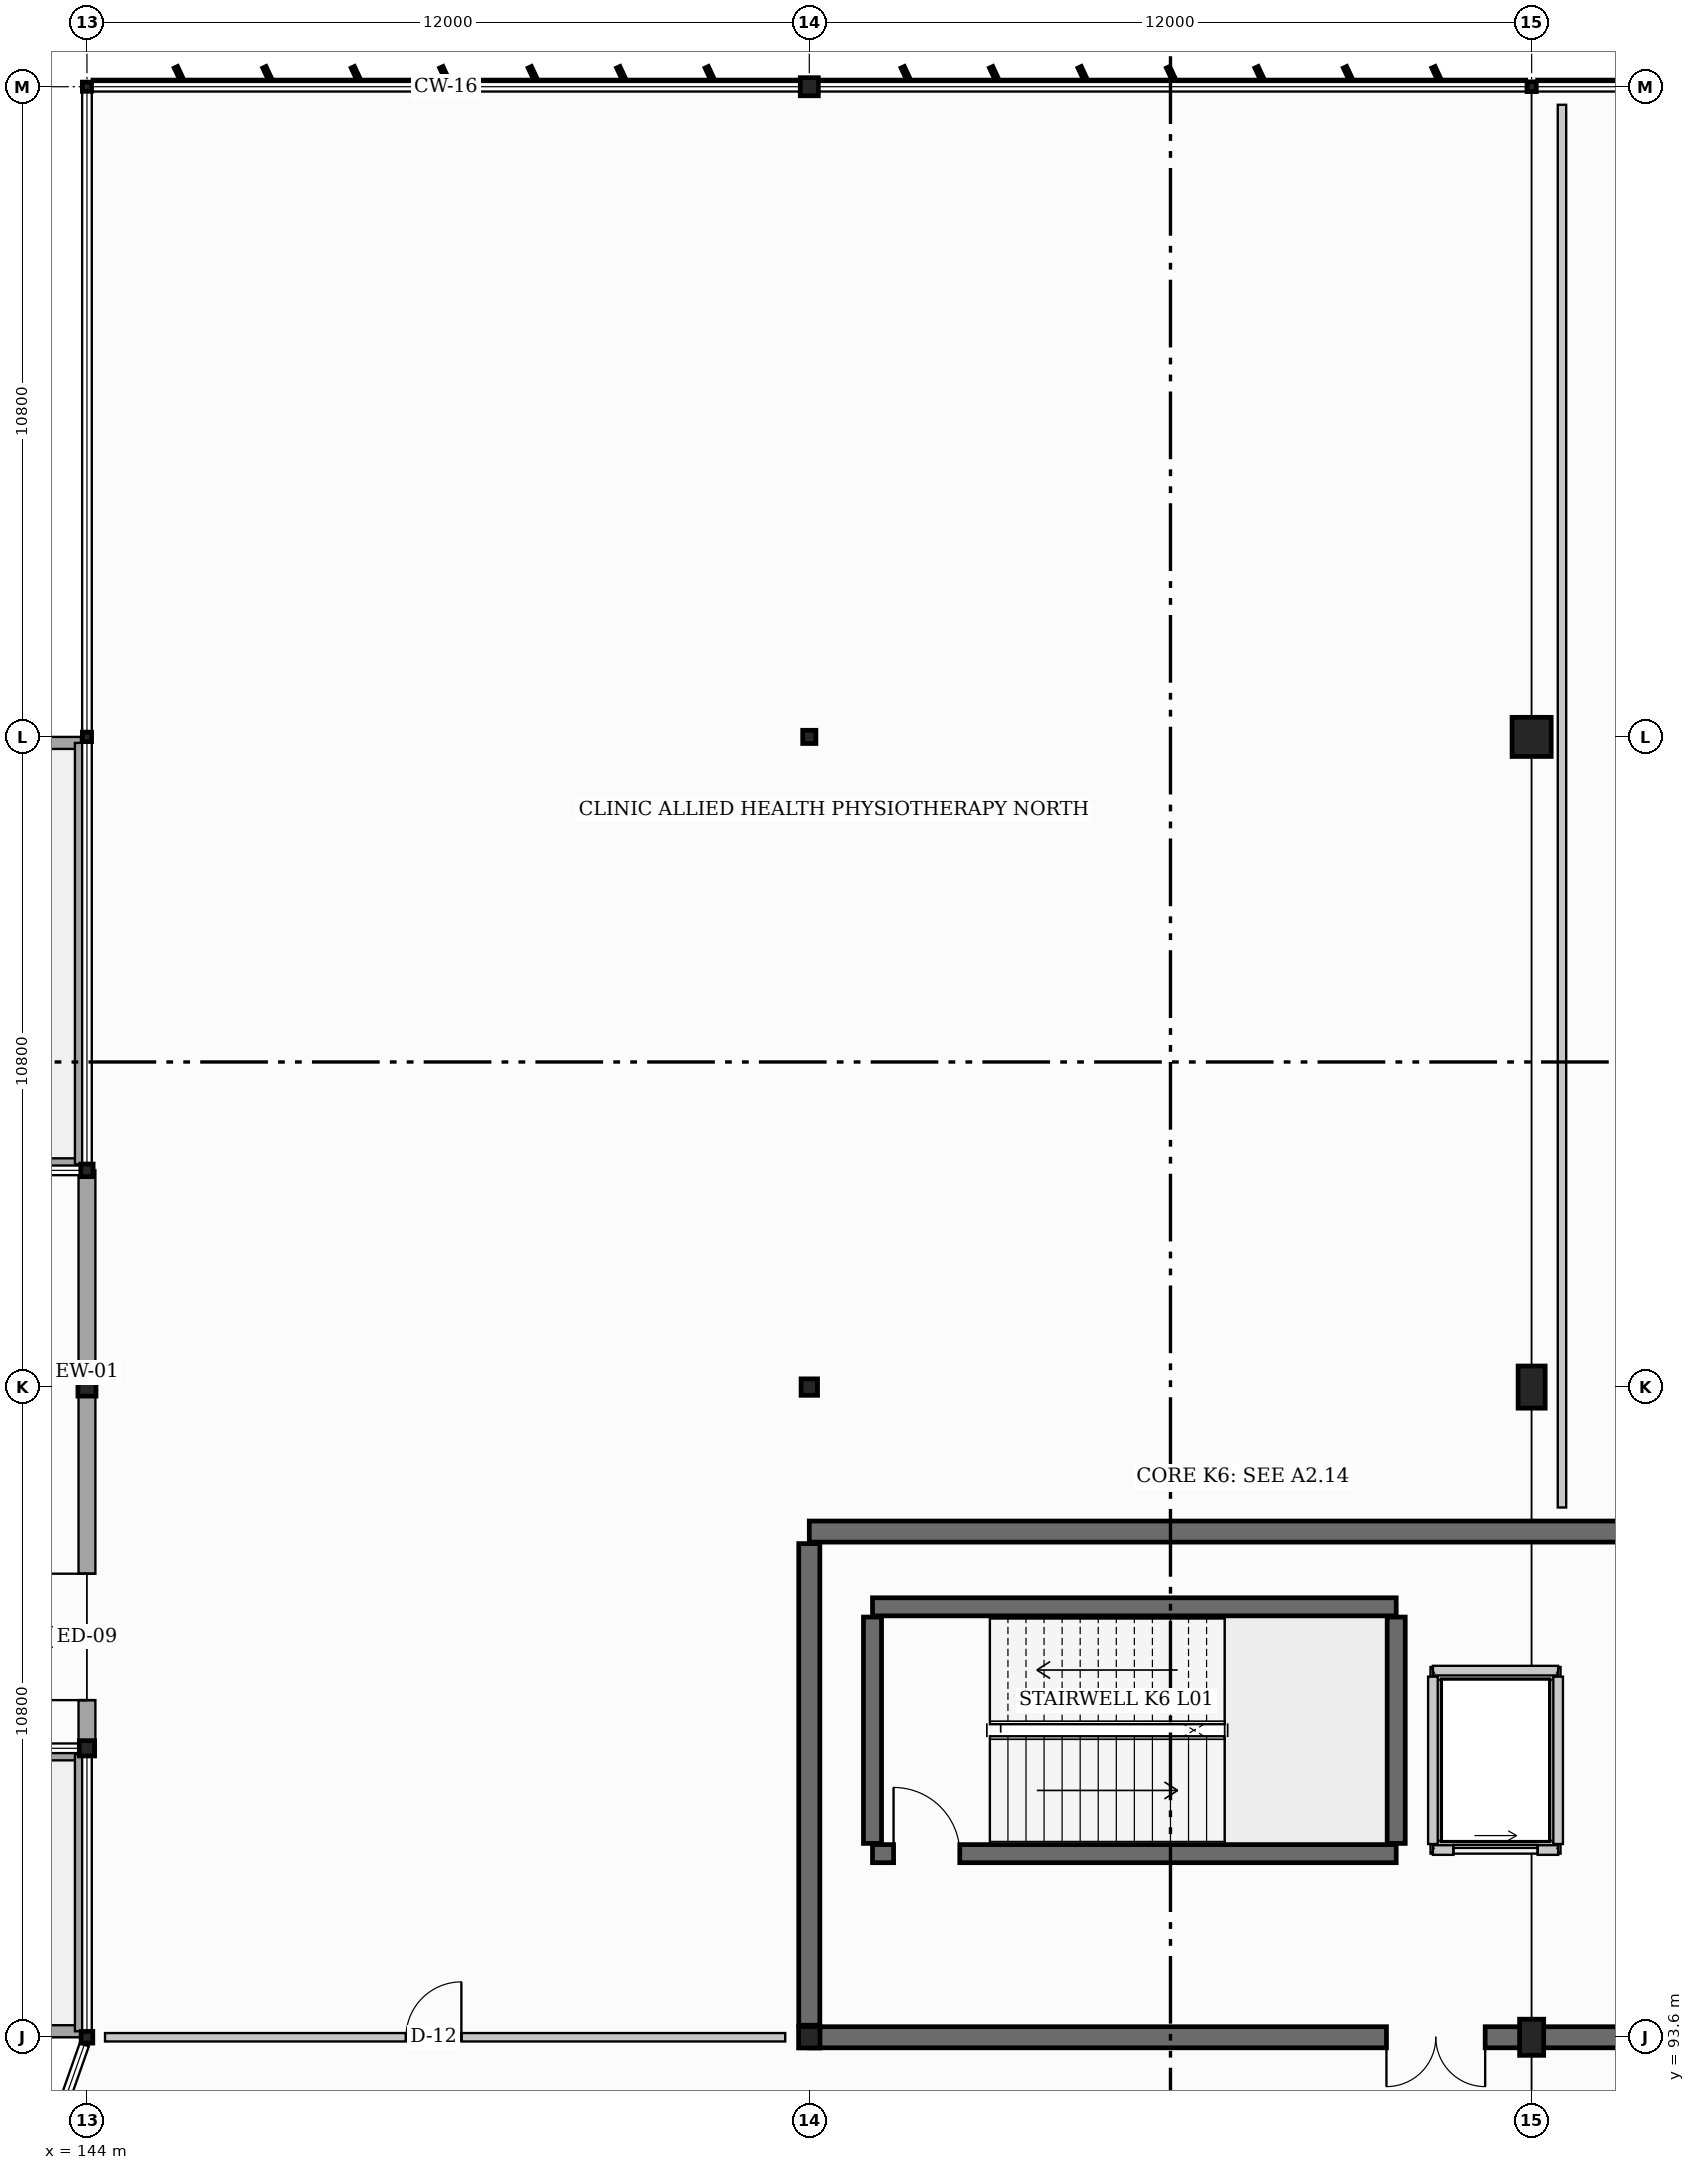
"""IFC4 building model, lengths in metres.
Left out: names, types, materials, properties, quantities, classifications, styles, units other than length and angle.
Written with IfcOpenShell. Run it as: python <this file> out.ifc"""

import sys

from ifc_helpers import new_model, si_unit, direction, frame, frame_2d, origin, origin_2d, place, context, subcontext, project, spatial, rectangle, hollow_rectangle, hollow_circle, i_section, extrude, element, fill, save


model = new_model("IFC4")
c1 = context("Model", 3, precision=1e-05, world=origin(), true_north=direction((0.0, 1.0)))
c2 = subcontext(c1, "Body", "Model", "MODEL_VIEW")
j1 = project(units=[si_unit("LENGTHUNIT", "METRE"), si_unit("PLANEANGLEUNIT", "RADIAN")], contexts=[c1])
p1 = place(None, origin())
s1 = spatial("IfcSite", under=j1, at=p1, CompositionType="ELEMENT")
p2 = place(p1, origin())
s2 = spatial("IfcBuilding", under=s1, at=p2, CompositionType="ELEMENT")
p3 = place(p2, frame((0.0, 0.0, 4.8)))
s3 = spatial("IfcBuildingStorey", under=s2, at=p3, CompositionType="ELEMENT", Elevation=4.8)
p4 = place(p3, frame((144.0, 93.6, 0.0), z_axis=(0.0, 0.0, 1.0), x_axis=(1.0, 0.0, 0.0)))
e1 = element("IfcColumn", 1, at=p4, inside=s3, PredefinedType="COLUMN", context=c2, shape_type="SweptSolid", body=[
    extrude(hollow_circle(Radius=0.097, WallThickness=0.008, at=origin_2d()), origin(), (0.0, 0.0, 1.0), 4.8),
])
p5 = place(p3, frame((144.0, 104.4, 0.0), z_axis=(0.0, 0.0, 1.0), x_axis=(1.0, 0.0, 0.0)))
e2 = element("IfcColumn", 2, at=p5, inside=s3, PredefinedType="COLUMN", context=c2, shape_type="SweptSolid", body=[
    extrude(hollow_rectangle(XDim=0.3, YDim=0.3, WallThickness=0.012, at=origin_2d()), origin(), (0.0, 0.0, 1.0), 4.8),
])
p6 = place(p3, frame((144.0, 115.2, 0.0), z_axis=(0.0, 0.0, 1.0), x_axis=(1.0, 0.0, 0.0)))
e3 = element("IfcColumn", 3, at=p6, inside=s3, PredefinedType="COLUMN", context=c2, shape_type="SweptSolid", body=[
    extrude(i_section(OverallWidth=0.153, OverallDepth=0.158, WebThickness=0.007, FlangeThickness=0.01, at=origin_2d()), origin(), (0.0, 0.0, 1.0), 4.8),
])
p7 = place(p3, frame((144.0, 126.0, 0.0), z_axis=(0.0, 0.0, 1.0), x_axis=(1.0, 0.0, 0.0)))
e4 = element("IfcColumn", 4, at=p7, inside=s3, PredefinedType="COLUMN", context=c2, shape_type="SweptSolid", body=[
    extrude(i_section(OverallWidth=0.152, OverallDepth=0.152, WebThickness=0.006, FlangeThickness=0.007, at=origin_2d()), origin(), (0.0, 0.0, 1.0), 4.8),
])
p8 = place(p3, frame((156.0, 93.6, 0.0), z_axis=(0.0, 0.0, 1.0), x_axis=(0.0, 1.0, 0.0)))
e5 = element("IfcColumn", 5, at=p8, inside=s3, PredefinedType="COLUMN", context=c2, shape_type="SweptSolid", body=[
    extrude(hollow_circle(Radius=0.178, WallThickness=0.013, at=origin_2d()), origin(), (0.0, 0.0, 1.0), 4.8),
])
p9 = place(p3, frame((156.0, 104.4, 0.0), z_axis=(0.0, 0.0, 1.0), x_axis=(0.0, 1.0, 0.0)))
e6 = element("IfcColumn", 6, at=p9, inside=s3, PredefinedType="COLUMN", context=c2, shape_type="SweptSolid", body=[
    extrude(hollow_circle(Radius=0.136, WallThickness=0.013, at=origin_2d()), origin(), (0.0, 0.0, 1.0), 4.8),
])
p10 = place(p3, frame((156.0, 115.2, 0.0), z_axis=(0.0, 0.0, 1.0), x_axis=(0.0, 1.0, 0.0)))
e7 = element("IfcColumn", 7, at=p10, inside=s3, PredefinedType="COLUMN", context=c2, shape_type="SweptSolid", body=[
    extrude(hollow_circle(Radius=0.11, WallThickness=0.01, at=origin_2d()), origin(), (0.0, 0.0, 1.0), 4.8),
])
p11 = place(p3, frame((156.0, 126.0, 0.0), z_axis=(0.0, 0.0, 1.0), x_axis=(0.0, 1.0, 0.0)))
e8 = element("IfcColumn", 8, at=p11, inside=s3, PredefinedType="COLUMN", context=c2, shape_type="SweptSolid", body=[
    extrude(hollow_rectangle(XDim=0.3, YDim=0.3, WallThickness=0.012, at=origin_2d()), origin(), (0.0, 0.0, 1.0), 4.8),
])
p12 = place(p3, frame((168.0, 93.6, 0.0), z_axis=(0.0, 0.0, 1.0), x_axis=(1.0, 0.0, 0.0)))
e9 = element("IfcColumn", 9, at=p12, inside=s3, PredefinedType="PILASTER", context=c2, shape_type="SweptSolid", body=[
    extrude(rectangle(XDim=0.4, YDim=0.6, at=origin_2d()), origin(), (0.0, 0.0, 1.0), 4.8),
])
p13 = place(p3, frame((168.0, 104.4, 0.0), z_axis=(0.0, 0.0, 1.0), x_axis=(1.0, 0.0, 0.0)))
e10 = element("IfcColumn", 10, at=p13, inside=s3, PredefinedType="PILASTER", context=c2, shape_type="SweptSolid", body=[
    extrude(rectangle(XDim=0.45, YDim=0.7, at=origin_2d()), origin(), (0.0, 0.0, 1.0), 4.8),
])
p14 = place(p3, frame((168.0, 115.2, 0.0), z_axis=(0.0, 0.0, 1.0), x_axis=(1.0, 0.0, 0.0)))
e11 = element("IfcColumn", 11, at=p14, inside=s3, PredefinedType="COLUMN", context=c2, shape_type="SweptSolid", body=[
    extrude(rectangle(XDim=0.65, YDim=0.65, at=origin_2d()), origin(), (0.0, 0.0, 1.0), 4.8),
])
p15 = place(p3, frame((168.0, 126.0, 0.0), z_axis=(0.0, 0.0, 1.0), x_axis=(1.0, 0.0, 0.0)))
e12 = element("IfcColumn", 12, at=p15, inside=s3, PredefinedType="COLUMN", context=c2, shape_type="SweptSolid", body=[
    extrude(i_section(OverallWidth=0.154, OverallDepth=0.162, WebThickness=0.008, FlangeThickness=0.011, at=origin_2d()), origin(), (0.0, 0.0, 1.0), 4.8),
])
p16 = place(p3, frame((144.0, 98.4, 0.0), z_axis=(0.0, 0.0, 1.0), x_axis=(1.0, 0.0, 0.0)))
e13 = element("IfcColumn", 13, at=p16, inside=s3, PredefinedType="COLUMN", context=c2, shape_type="SweptSolid", body=[
    extrude(i_section(OverallWidth=0.254, OverallDepth=0.254, WebThickness=0.009, FlangeThickness=0.014, at=origin_2d()), origin(), (0.0, 0.0, 1.0), 4.8),
])
p17 = place(p3, frame((144.0, 108.0, 0.0), z_axis=(0.0, 0.0, 1.0), x_axis=(1.0, 0.0, 0.0)))
e14 = element("IfcColumn", 14, at=p17, inside=s3, PredefinedType="COLUMN", context=c2, shape_type="SweptSolid", body=[
    extrude(i_section(OverallWidth=0.205, OverallDepth=0.21, WebThickness=0.009, FlangeThickness=0.014, at=origin_2d()), origin(), (0.0, 0.0, 1.0), 4.8),
])
p18 = place(p3, frame((156.0, 102.0, 0.0), z_axis=(0.0, 0.0, 1.0), x_axis=(1.0, 0.0, 0.0)))
e15 = element("IfcWall", 15, at=p18, inside=s3, PredefinedType="SHEAR", context=c2, shape_type="SweptSolid", body=[
    extrude(rectangle(XDim=14.4, YDim=0.35, at=frame_2d((7.2, 0.0))), origin(), (0.0, 0.0, 1.0), 4.8),
])
p19 = place(p3, frame((170.4, 93.6, 0.0), z_axis=(0.0, 0.0, 1.0), x_axis=(-1.0, 0.0, 0.0)))
e16 = element("IfcWall", 16, at=p19, inside=s3, PredefinedType="SHEAR", context=c2, shape_type="SweptSolid", body=[
    extrude(rectangle(XDim=14.4, YDim=0.35, at=frame_2d((7.2, 0.0))), origin(), (0.0, 0.0, 1.0), 4.8),
])
p20 = place(p19, frame((3.172, 0.0, 0.0)))
e17 = element("IfcOpeningElement", 17, at=p20, cuts=e16, PredefinedType="OPENING", context=c2, shape_type="SweptSolid", body=[
    extrude(rectangle(XDim=1.64, YDim=2.2, at=frame_2d((0.82, 1.1))), frame((0.0, 0.185, 0.0), z_axis=(0.0, -1.0, 0.0), x_axis=(1.0, 0.0, 0.0)), (0.0, 0.0, 1.0), 0.37),
])
p21 = place(p3, frame((156.0, 93.8, 0.0), z_axis=(0.0, 0.0, 1.0), x_axis=(0.0, 1.0, 0.0)))
e18 = element("IfcWall", 18, at=p21, inside=s3, PredefinedType="SHEAR", context=c2, shape_type="SweptSolid", body=[
    extrude(rectangle(XDim=8.0, YDim=0.35, at=frame_2d((4.0, 0.0))), origin(), (0.0, 0.0, 1.0), 4.8),
])
p22 = place(p3, frame((157.05, 96.65, 0.0), z_axis=(0.0, 0.0, 1.0), x_axis=(1.0, 0.0, 0.0)))
e19 = element("IfcWall", 19, at=p22, inside=s3, PredefinedType="SHEAR", context=c2, shape_type="SweptSolid", body=[
    extrude(rectangle(XDim=8.7, YDim=0.3, at=frame_2d((4.35, 0.0))), origin(), (0.0, 0.0, 1.0), 4.8),
])
p23 = place(p22, frame((0.35, 0.0, 0.0)))
e20 = element("IfcOpeningElement", 20, at=p23, cuts=e19, PredefinedType="OPENING", context=c2, shape_type="SweptSolid", body=[
    extrude(rectangle(XDim=1.1, YDim=2.15, at=frame_2d((0.55, 1.075))), frame((0.0, 0.16, 0.0), z_axis=(0.0, -1.0, 0.0), x_axis=(1.0, 0.0, 0.0)), (0.0, 0.0, 1.0), 0.32),
])
p24 = place(p3, frame((165.75, 100.75, 0.0), z_axis=(0.0, 0.0, 1.0), x_axis=(-1.0, 0.0, 0.0)))
e21 = element("IfcWall", 21, at=p24, inside=s3, PredefinedType="SHEAR", context=c2, shape_type="SweptSolid", body=[
    extrude(rectangle(XDim=8.7, YDim=0.3, at=frame_2d((4.35, 0.0))), origin(), (0.0, 0.0, 1.0), 4.8),
])
for number, where, z_axis, x_axis in (
    (22, (157.05, 96.82, 0.0), (0.0, 0.0, 1.0), (0.0, 1.0, 0.0)),
    (23, (165.75, 96.82, 0.0), (0.0, 0.0, 1.0), (0.0, 1.0, 0.0)),
):
    element("IfcWall", number, at=place(p3, frame(where, z_axis=z_axis, x_axis=x_axis)), inside=s3, PredefinedType="SHEAR", context=c2, shape_type="SweptSolid", body=[
        extrude(rectangle(XDim=3.76, YDim=0.3, at=frame_2d((1.88, 0.0))), origin(), (0.0, 0.0, 1.0), 4.8),
    ])
p25 = place(p3, frame((144.0, 98.4, 0.0), z_axis=(0.0, 0.0, 1.0), x_axis=(0.0, 1.0, 0.0)))
e24 = element("IfcWall", 24, at=p25, inside=s3, PredefinedType="STANDARD", context=c2, shape_type="SweptSolid", body=[
    extrude(rectangle(XDim=9.6, YDim=0.28, at=frame_2d((4.8, 0.0))), origin(), (0.0, 0.0, 1.0), 3.48),
])
p26 = place(p25, frame((0.8, 0.0, 0.0)))
e25 = element("IfcOpeningElement", 25, at=p26, cuts=e24, PredefinedType="OPENING", context=c2, shape_type="SweptSolid", body=[
    extrude(rectangle(XDim=2.1, YDim=2.25, at=frame_2d((1.05, 1.125))), frame((0.0, 0.15, 0.0), z_axis=(0.0, -1.0, 0.0), x_axis=(1.0, 0.0, 0.0)), (0.0, 0.0, 1.0), 0.3),
])
for number, where, z_axis, x_axis in (
    (26, (143.9, 93.7, 0.31), (0.0, 0.0, 1.0), (-1.0, 0.0, 0.0)),
    (27, (132.1, 98.3, 0.31), (0.0, 0.0, 1.0), (1.0, 0.0, 0.0)),
):
    element("IfcWall", number, at=place(p3, frame(where, z_axis=z_axis, x_axis=x_axis)), inside=s3, PredefinedType="PARAPET", context=c2, shape_type="SweptSolid", body=[
        extrude(rectangle(XDim=11.8, YDim=0.2, at=frame_2d((5.9, 0.0))), origin(), (0.0, 0.0, 1.0), 1.12),
    ])
p27 = place(p3, frame((143.9, 98.3, 0.31), z_axis=(0.0, 0.0, 1.0), x_axis=(0.0, -1.0, 0.0)))
e28 = element("IfcWall", 28, at=p27, inside=s3, PredefinedType="PARAPET", context=c2, shape_type="SweptSolid", body=[
    extrude(rectangle(XDim=4.6, YDim=0.2, at=frame_2d((2.3, 0.0))), origin(), (0.0, 0.0, 1.0), 1.12),
])
for number, where, z_axis, x_axis in (
    (29, (143.9, 108.1, 0.31), (0.0, 0.0, 1.0), (-1.0, 0.0, 0.0)),
    (30, (132.1, 115.1, 0.31), (0.0, 0.0, 1.0), (1.0, 0.0, 0.0)),
):
    element("IfcWall", number, at=place(p3, frame(where, z_axis=z_axis, x_axis=x_axis)), inside=s3, PredefinedType="PARAPET", context=c2, shape_type="SweptSolid", body=[
        extrude(rectangle(XDim=11.8, YDim=0.2, at=frame_2d((5.9, 0.0))), origin(), (0.0, 0.0, 1.0), 1.12),
    ])
p28 = place(p3, frame((143.9, 115.1, 0.31), z_axis=(0.0, 0.0, 1.0), x_axis=(0.0, -1.0, 0.0)))
e31 = element("IfcWall", 31, at=p28, inside=s3, PredefinedType="PARAPET", context=c2, shape_type="SweptSolid", body=[
    extrude(rectangle(XDim=7.0, YDim=0.2, at=frame_2d((3.5, 0.0))), origin(), (0.0, 0.0, 1.0), 1.12),
])
p29 = place(p3, frame((166.36, 96.71, 0.0), z_axis=(0.0, 0.0, 1.0), x_axis=(1.0, 0.0, 0.0)))
e32 = element("IfcWall", 32, at=p29, inside=s3, PredefinedType="PARTITIONING", context=c2, shape_type="SweptSolid", body=[
    extrude(rectangle(XDim=2.08, YDim=0.16, at=frame_2d((1.04, 0.0))), origin(), (0.0, 0.0, 1.0), 4.43),
])
p30 = place(p29, frame((0.34, 0.0, 0.0)))
e33 = element("IfcOpeningElement", 33, at=p30, cuts=e32, PredefinedType="OPENING", context=c2, shape_type="SweptSolid", body=[
    extrude(rectangle(XDim=1.4, YDim=2.2, at=frame_2d((0.7, 1.1))), frame((0.0, 0.09, 0.0), z_axis=(0.0, -1.0, 0.0), x_axis=(1.0, 0.0, 0.0)), (0.0, 0.0, 1.0), 0.18),
])
p31 = place(p3, frame((168.44, 99.69, 0.0), z_axis=(0.0, 0.0, 1.0), x_axis=(-1.0, 0.0, 0.0)))
e34 = element("IfcWall", 34, at=p31, inside=s3, PredefinedType="PARTITIONING", context=c2, shape_type="SweptSolid", body=[
    extrude(rectangle(XDim=2.08, YDim=0.16, at=frame_2d((1.04, 0.0))), origin(), (0.0, 0.0, 1.0), 4.43),
])
for number, where, z_axis, x_axis in (
    (35, (166.36, 99.59, 0.0), (0.0, 0.0, 1.0), (0.0, -1.0, 0.0)),
    (36, (168.44, 96.81, 0.0), (0.0, 0.0, 1.0), (0.0, 1.0, 0.0)),
):
    element("IfcWall", number, at=place(p3, frame(where, z_axis=z_axis, x_axis=x_axis)), inside=s3, PredefinedType="PARTITIONING", context=c2, shape_type="SweptSolid", body=[
        extrude(rectangle(XDim=2.78, YDim=0.16, at=frame_2d((1.39, 0.0))), origin(), (0.0, 0.0, 1.0), 4.43),
    ])
p32 = place(p3, frame((144.3, 93.6, 0.0), z_axis=(0.0, 0.0, 1.0), x_axis=(1.0, 0.0, 0.0)))
e37 = element("IfcWall", 37, at=p32, inside=s3, PredefinedType="PARTITIONING", context=c2, shape_type="SweptSolid", body=[
    extrude(rectangle(XDim=11.3, YDim=0.14, at=frame_2d((5.65, 0.0))), origin(), (0.0, 0.0, 1.0), 3.897),
])
p33 = place(p32, frame((5.0, 0.0, 0.0)))
e38 = element("IfcOpeningElement", 38, at=p33, cuts=e37, PredefinedType="OPENING", context=c2, shape_type="SweptSolid", body=[
    extrude(rectangle(XDim=0.92, YDim=2.04, at=frame_2d((0.46, 1.02))), frame((0.0, 0.08, 0.0), z_axis=(0.0, -1.0, 0.0), x_axis=(1.0, 0.0, 0.0)), (0.0, 0.0, 1.0), 0.16),
])
p34 = place(p3, frame((168.504, 102.4, 0.0), z_axis=(0.0, 0.0, 1.0), x_axis=(0.0, 1.0, 0.0)))
e39 = element("IfcWall", 39, at=p34, inside=s3, PredefinedType="PARTITIONING", context=c2, shape_type="SweptSolid", body=[
    extrude(rectangle(XDim=23.3, YDim=0.14, at=frame_2d((11.65, 0.0))), origin(), (0.0, 0.0, 1.0), 3.48),
])
p35 = place(p26, origin())
e40 = element("IfcDoor", 40, at=p35, inside=s3, OperationType="DOUBLE_DOOR_SINGLE_SWING", PredefinedType="DOOR", context=c2, shape_type="SweptSolid", body=[
    extrude(rectangle(XDim=2.1, YDim=2.25, at=frame_2d((1.05, 1.125))), frame((0.0, 0.025, 0.0), z_axis=(0.0, -1.0, 0.0), x_axis=(1.0, 0.0, 0.0)), (0.0, 0.0, 1.0), 0.05),
])
fill(e25, e40)
p36 = place(p30, origin())
e41 = element("IfcDoor", 41, at=p36, inside=s3, OperationType="SLIDING_TO_RIGHT", PredefinedType="DOOR", context=c2, shape_type="SweptSolid", body=[
    extrude(rectangle(XDim=1.4, YDim=2.2, at=frame_2d((0.7, 1.1))), frame((0.0, 0.025, 0.0), z_axis=(0.0, -1.0, 0.0), x_axis=(1.0, 0.0, 0.0)), (0.0, 0.0, 1.0), 0.05),
])
fill(e33, e41)
p37 = place(p23, origin())
e42 = element("IfcDoor", 42, at=p37, inside=s3, OperationType="SINGLE_SWING_LEFT", PredefinedType="DOOR", context=c2, shape_type="SweptSolid", body=[
    extrude(rectangle(XDim=1.1, YDim=2.15, at=frame_2d((0.55, 1.075))), frame((0.0, 0.025, 0.0), z_axis=(0.0, -1.0, 0.0), x_axis=(1.0, 0.0, 0.0)), (0.0, 0.0, 1.0), 0.05),
])
fill(e20, e42)
p38 = place(p20, origin())
e43 = element("IfcDoor", 43, at=p38, inside=s3, OperationType="DOUBLE_DOOR_SINGLE_SWING", PredefinedType="DOOR", context=c2, shape_type="SweptSolid", body=[
    extrude(rectangle(XDim=1.64, YDim=2.2, at=frame_2d((0.82, 1.1))), frame((0.0, 0.025, 0.0), z_axis=(0.0, -1.0, 0.0), x_axis=(1.0, 0.0, 0.0)), (0.0, 0.0, 1.0), 0.05),
])
fill(e17, e43)
p39 = place(p33, origin())
e44 = element("IfcDoor", 44, at=p39, inside=s3, OperationType="SINGLE_SWING_RIGHT", PredefinedType="DOOR", context=c2, shape_type="SweptSolid", body=[
    extrude(rectangle(XDim=0.92, YDim=2.04, at=frame_2d((0.46, 1.02))), frame((0.0, 0.025, 0.0), z_axis=(0.0, -1.0, 0.0), x_axis=(1.0, 0.0, 0.0)), (0.0, 0.0, 1.0), 0.05),
])
fill(e38, e44)
save(model, sys.argv[1])
